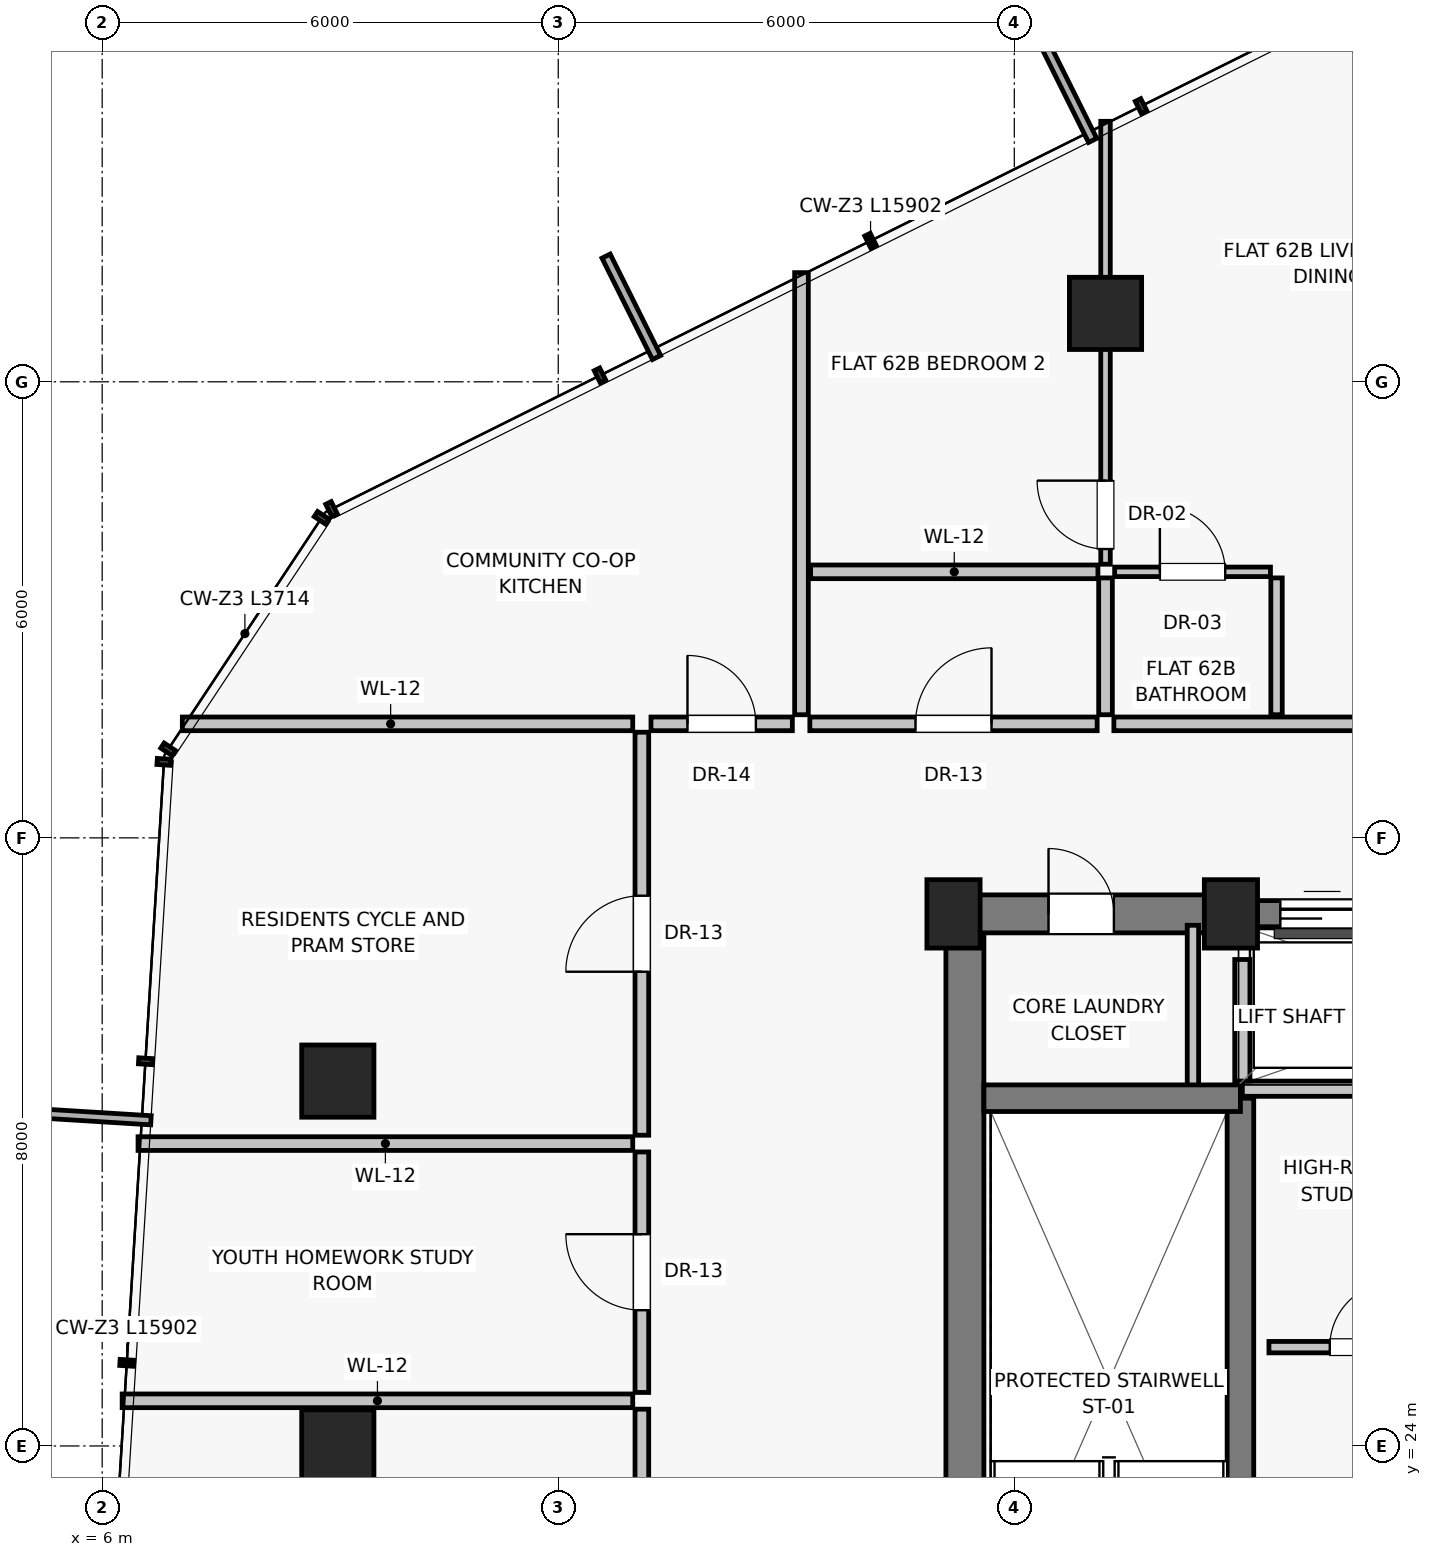
"""IFC4 building model, lengths in metres.
Left out: names, types, materials, properties, quantities, classifications, styles, units other than length and angle.
Written with IfcOpenShell. Run it as: python <this file> out.ifc"""

import sys

from ifc_helpers import new_model, si_unit, direction, frame, frame_2d, origin, origin_2d, place, context, subcontext, project, spatial, rectangle, extrude, source, transform, mapped, element, fill, save


model = new_model("IFC4")
c1 = context("Model", 3, precision=1e-05, world=origin(), true_north=direction((0.0, 1.0)))
c2 = subcontext(c1, "Body", "Model", "MODEL_VIEW")
j1 = project(units=[si_unit("LENGTHUNIT", "METRE"), si_unit("PLANEANGLEUNIT", "RADIAN")], contexts=[c1])
p1 = place(None, origin())
s1 = spatial("IfcSite", under=j1, at=p1, CompositionType="ELEMENT")
p2 = place(p1, origin())
s2 = spatial("IfcBuilding", under=s1, at=p2, CompositionType="ELEMENT")
p3 = place(p2, frame((0.0, 0.0, 218.9)))
s3 = spatial("IfcBuildingStorey", under=s2, at=p3, CompositionType="ELEMENT", Elevation=218.9)
for number, where, z_axis, x_axis in (
    (1, (17.2, 31.0, 0.0), (0.0, 0.0, 1.0), (1.0, 0.0, 0.0)),
    (2, (20.85, 31.0, 0.0), (0.0, 0.0, 1.0), (1.0, 0.0, 0.0)),
):
    element("IfcColumn", number, at=place(p3, frame(where, z_axis=z_axis, x_axis=x_axis)), inside=s3, PredefinedType="PILASTER", context=c2, shape_type="SweptSolid", body=[
        extrude(rectangle(XDim=0.7, YDim=0.9, at=origin_2d()), origin(), (0.0, 0.0, 1.0), 3.25),
    ])
for number, where, z_axis, x_axis in (
    (3, (19.2, 38.9, 0.0), (0.0, 0.0, 1.0), (1.0, 0.0, 0.0)),
    (4, (9.1, 28.8, 0.0), (0.0, 0.0, 1.0), (1.0, 0.0, 0.0)),
    (5, (9.1, 24.0, 0.0), (0.0, 0.0, 1.0), (1.0, 0.0, 0.0)),
):
    element("IfcColumn", number, at=place(p3, frame(where, z_axis=z_axis, x_axis=x_axis)), inside=s3, PredefinedType="COLUMN", context=c2, shape_type="SweptSolid", body=[
        extrude(rectangle(XDim=0.95, YDim=0.95, at=origin_2d()), origin(), (0.0, 0.0, 1.0), 3.25),
    ])
p4 = place(p3, frame((17.35, 16.8, 0.0), z_axis=(0.0, 0.0, 1.0), x_axis=(0.0, 1.0, 0.0)))
e6 = element("IfcWall", 6, at=p4, inside=s3, PredefinedType="SHEAR", context=c2, shape_type="SweptSolid", body=[
    extrude(rectangle(XDim=14.2, YDim=0.5, at=frame_2d((7.1, 0.0))), origin(), (0.0, 0.0, 1.0), 3.015),
])
p5 = place(p3, frame((17.2, 31.0, 0.0), z_axis=(0.0, 0.0, 1.0), x_axis=(1.0, 0.0, 0.0)))
e7 = element("IfcWall", 7, at=p5, inside=s3, PredefinedType="SHEAR", context=c2, shape_type="SweptSolid", body=[
    extrude(rectangle(XDim=3.8, YDim=0.5, at=frame_2d((1.9, 0.0))), origin(), (0.0, 0.0, 1.0), 3.015),
])
p6 = place(p5, frame((1.25, 0.0, 0.0)))
e8 = element("IfcOpeningElement", 8, at=p6, cuts=e7, PredefinedType="OPENING", context=c2, shape_type="SweptSolid", body=[
    extrude(rectangle(XDim=0.86, YDim=2.01, at=frame_2d((0.43, 1.005))), frame((0.0, 0.26, 0.0), z_axis=(0.0, -1.0, 0.0), x_axis=(1.0, 0.0, 0.0)), (0.0, 0.0, 1.0), 0.52),
])
p7 = place(p3, frame((21.0, 31.0, 0.0), z_axis=(0.0, 0.0, 1.0), x_axis=(1.0, 0.0, 0.0)))
e9 = element("IfcWall", 9, at=p7, inside=s3, PredefinedType="SHEAR", context=c2, shape_type="SweptSolid", body=[
    extrude(rectangle(XDim=6.0, YDim=0.35, at=frame_2d((3.0, 0.0))), origin(), (0.0, 0.0, 1.0), 3.015),
])
p8 = place(p7, frame((0.5, 0.0, 0.0)))
e10 = element("IfcOpeningElement", 10, at=p8, cuts=e9, PredefinedType="OPENING", context=c2, shape_type="SweptSolid", body=[
    extrude(rectangle(XDim=1.1, YDim=2.08, at=frame_2d((0.55, 1.04))), frame((0.0, 0.185, 0.0), z_axis=(0.0, -1.0, 0.0), x_axis=(1.0, 0.0, 0.0)), (0.0, 0.0, 1.0), 0.37),
])
p9 = place(p7, frame((2.45, 0.0, 0.0)))
e11 = element("IfcOpeningElement", 11, at=p9, cuts=e9, PredefinedType="OPENING", context=c2, shape_type="SweptSolid", body=[
    extrude(rectangle(XDim=1.1, YDim=2.08, at=frame_2d((0.55, 1.04))), frame((0.0, 0.185, 0.0), z_axis=(0.0, -1.0, 0.0), x_axis=(1.0, 0.0, 0.0)), (0.0, 0.0, 1.0), 0.37),
])
p10 = place(p7, frame((4.4, 0.0, 0.0)))
e12 = element("IfcOpeningElement", 12, at=p10, cuts=e9, PredefinedType="OPENING", context=c2, shape_type="SweptSolid", body=[
    extrude(rectangle(XDim=1.1, YDim=2.08, at=frame_2d((0.55, 1.04))), frame((0.0, 0.185, 0.0), z_axis=(0.0, -1.0, 0.0), x_axis=(1.0, 0.0, 0.0)), (0.0, 0.0, 1.0), 0.37),
])
p11 = place(p3, frame((20.35, 28.65, 0.0), z_axis=(0.0, 0.0, 1.0), x_axis=(0.0, 1.0, 0.0)))
e13 = element("IfcWall", 13, at=p11, inside=s3, PredefinedType="PARTITIONING", context=c2, shape_type="SweptSolid", body=[
    extrude(rectangle(XDim=2.2, YDim=0.15, at=frame_2d((1.1, 0.0))), origin(), (0.0, 0.0, 1.0), 3.015),
])
p12 = place(p3, frame((20.975, 19.8, 0.0), z_axis=(0.0, 0.0, 1.0), x_axis=(0.0, 1.0, 0.0)))
e14 = element("IfcWall", 14, at=p12, inside=s3, PredefinedType="SHEAR", context=c2, shape_type="SweptSolid", body=[
    extrude(rectangle(XDim=8.775, YDim=0.35, at=frame_2d((4.387, 0.0))), origin(), (0.0, 0.0, 1.0), 3.015),
])
p13 = place(p3, frame((17.6, 28.575, 0.0), z_axis=(0.0, 0.0, 1.0), x_axis=(1.0, 0.0, 0.0)))
e15 = element("IfcWall", 15, at=p13, inside=s3, PredefinedType="SHEAR", context=c2, shape_type="SweptSolid", body=[
    extrude(rectangle(XDim=3.375, YDim=0.35, at=frame_2d((1.688, 0.0))), origin(), (0.0, 0.0, 1.0), 3.015),
])
p14 = place(p3, frame((21.0, 28.7, 0.0), z_axis=(0.0, 0.0, 1.0), x_axis=(1.0, 0.0, 0.0)))
e16 = element("IfcWall", 16, at=p14, inside=s3, PredefinedType="SOLIDWALL", context=c2, shape_type="SweptSolid", body=[
    extrude(rectangle(XDim=6.0, YDim=0.2, at=frame_2d((3.0, 0.0))), origin(), (0.0, 0.0, 1.0), 3.015),
])
p15 = place(p3, frame((21.0, 28.8, 0.0), z_axis=(0.0, 0.0, 1.0), x_axis=(0.0, 1.0, 0.0)))
e17 = element("IfcWall", 17, at=p15, inside=s3, PredefinedType="SOLIDWALL", context=c2, shape_type="SweptSolid", body=[
    extrude(rectangle(XDim=1.6, YDim=0.2, at=frame_2d((0.8, 0.0))), origin(), (0.0, 0.0, 1.0), 3.015),
])
p16 = place(p3, frame((21.35, 25.3, 0.0), z_axis=(0.0, 0.0, 1.0), x_axis=(1.0, 0.0, 0.0)))
e18 = element("IfcWall", 18, at=p16, inside=s3, PredefinedType="PARTITIONING", context=c2, shape_type="SweptSolid", body=[
    extrude(rectangle(XDim=2.55, YDim=0.15, at=frame_2d((1.275, 0.0))), origin(), (0.0, 0.0, 1.0), 3.015),
])
p17 = place(p16, frame((0.8, 0.0, 0.0)))
e19 = element("IfcOpeningElement", 19, at=p17, cuts=e18, PredefinedType="OPENING", context=c2, shape_type="SweptSolid", body=[
    extrude(rectangle(XDim=0.86, YDim=2.01, at=frame_2d((0.43, 1.005))), frame((0.0, 0.085, 0.0), z_axis=(0.0, -1.0, 0.0), x_axis=(1.0, 0.0, 0.0)), (0.0, 0.0, 1.0), 0.17),
])
p18 = place(p3, frame((15.2, 33.62, 0.0), z_axis=(0.0, 0.0, 1.0), x_axis=(0.0, 1.0, 0.0)))
e20 = element("IfcWall", 20, at=p18, inside=s3, PredefinedType="PARTITIONING", context=c2, shape_type="SweptSolid", body=[
    extrude(rectangle(XDim=5.816, YDim=0.18, at=frame_2d((2.908, 0.0))), origin(), (0.0, 0.0, 1.0), 3.015),
])
p19 = place(p3, frame((15.31, 33.5, 0.0), z_axis=(0.0, 0.0, 1.0), x_axis=(1.0, 0.0, 0.0)))
e21 = element("IfcWall", 21, at=p19, inside=s3, PredefinedType="PARTITIONING", context=c2, shape_type="SweptSolid", body=[
    extrude(rectangle(XDim=3.78, YDim=0.18, at=frame_2d((1.89, 0.0))), origin(), (0.0, 0.0, 1.0), 3.015),
])
p20 = place(p19, frame((1.39, 0.0, 0.0)))
e22 = element("IfcOpeningElement", 22, at=p20, cuts=e21, PredefinedType="OPENING", context=c2, shape_type="SweptSolid", body=[
    extrude(rectangle(XDim=1.0, YDim=2.01, at=frame_2d((0.5, 1.005))), frame((0.0, 0.1, 0.0), z_axis=(0.0, -1.0, 0.0), x_axis=(1.0, 0.0, 0.0)), (0.0, 0.0, 1.0), 0.2),
])
p21 = place(p3, frame((19.31, 33.5, 0.0), z_axis=(0.0, 0.0, 1.0), x_axis=(1.0, 0.0, 0.0)))
e23 = element("IfcWall", 23, at=p21, inside=s3, PredefinedType="PARTITIONING", context=c2, shape_type="SweptSolid", body=[
    extrude(rectangle(XDim=11.78, YDim=0.18, at=frame_2d((5.89, 0.0))), origin(), (0.0, 0.0, 1.0), 3.015),
])
p22 = place(p21, frame((3.98, 0.0, 0.0)))
e24 = element("IfcOpeningElement", 24, at=p22, cuts=e23, PredefinedType="OPENING", context=c2, shape_type="SweptSolid", body=[
    extrude(rectangle(XDim=0.95, YDim=2.02, at=frame_2d((0.475, 1.01))), frame((0.0, 0.1, 0.0), z_axis=(0.0, -1.0, 0.0), x_axis=(1.0, 0.0, 0.0)), (0.0, 0.0, 1.0), 0.2),
])
p23 = place(p3, frame((15.32, 35.5, 0.0), z_axis=(0.0, 0.0, 1.0), x_axis=(1.0, 0.0, 0.0)))
e25 = element("IfcWall", 25, at=p23, inside=s3, PredefinedType="PARTITIONING", context=c2, shape_type="SweptSolid", body=[
    extrude(rectangle(XDim=3.78, YDim=0.18, at=frame_2d((1.89, 0.0))), origin(), (0.0, 0.0, 1.0), 3.015),
])
p24 = place(p3, frame((19.2, 33.62, 0.0), z_axis=(0.0, 0.0, 1.0), x_axis=(0.0, 1.0, 0.0)))
e26 = element("IfcWall", 26, at=p24, inside=s3, PredefinedType="PARTITIONING", context=c2, shape_type="SweptSolid", body=[
    extrude(rectangle(XDim=1.8, YDim=0.18, at=frame_2d((0.9, 0.0))), origin(), (0.0, 0.0, 1.0), 3.015),
])
p25 = place(p3, frame((19.2, 35.6, 0.0), z_axis=(0.0, 0.0, 1.0), x_axis=(0.0, 1.0, 0.0)))
e27 = element("IfcWall", 27, at=p25, inside=s3, PredefinedType="PARTITIONING", context=c2, shape_type="SweptSolid", body=[
    extrude(rectangle(XDim=5.827, YDim=0.125, at=frame_2d((2.914, 0.0))), origin(), (0.0, 0.0, 1.0), 2.469),
])
p26 = place(p25, frame((0.2, 0.0, 0.0)))
e28 = element("IfcOpeningElement", 28, at=p26, cuts=e27, PredefinedType="OPENING", context=c2, shape_type="SweptSolid", body=[
    extrude(rectangle(XDim=0.9, YDim=2.01, at=frame_2d((0.45, 1.005))), frame((0.0, 0.073, 0.0), z_axis=(0.0, -1.0, 0.0), x_axis=(1.0, 0.0, 0.0)), (0.0, 0.0, 1.0), 0.145),
])
p27 = place(p3, frame((21.45, 33.62, 0.0), z_axis=(0.0, 0.0, 1.0), x_axis=(0.0, 1.0, 0.0)))
e29 = element("IfcWall", 29, at=p27, inside=s3, PredefinedType="PARTITIONING", context=c2, shape_type="SweptSolid", body=[
    extrude(rectangle(XDim=1.8, YDim=0.15, at=frame_2d((0.9, 0.0))), origin(), (0.0, 0.0, 1.0), 3.015),
])
p28 = place(p3, frame((19.32, 35.5, 0.0), z_axis=(0.0, 0.0, 1.0), x_axis=(1.0, 0.0, 0.0)))
e30 = element("IfcWall", 30, at=p28, inside=s3, PredefinedType="PARTITIONING", context=c2, shape_type="SweptSolid", body=[
    extrude(rectangle(XDim=2.05, YDim=0.125, at=frame_2d((1.025, 0.0))), origin(), (0.0, 0.0, 1.0), 2.662),
])
p29 = place(p28, frame((0.595, 0.0, 0.0)))
e31 = element("IfcOpeningElement", 31, at=p29, cuts=e30, PredefinedType="OPENING", context=c2, shape_type="SweptSolid", body=[
    extrude(rectangle(XDim=0.86, YDim=2.01, at=frame_2d((0.43, 1.005))), frame((0.0, 0.073, 0.0), z_axis=(0.0, -1.0, 0.0), x_axis=(1.0, 0.0, 0.0)), (0.0, 0.0, 1.0), 0.145),
])
p30 = place(p3, frame((12.98, 33.5, 0.0), z_axis=(0.0, 0.0, 1.0), x_axis=(-1.0, 0.0, 0.0)))
e32 = element("IfcWall", 32, at=p30, inside=s3, PredefinedType="PARTITIONING", context=c2, shape_type="SweptSolid", body=[
    extrude(rectangle(XDim=5.926, YDim=0.18, at=frame_2d((2.963, 0.0))), origin(), (0.0, 0.0, 1.0), 3.015),
])
p31 = place(p3, frame((13.1, 18.322, 0.0), z_axis=(0.0, 0.0, 1.0), x_axis=(0.0, 1.0, 0.0)))
e33 = element("IfcWall", 33, at=p31, inside=s3, PredefinedType="PARTITIONING", context=c2, shape_type="SweptSolid", body=[
    extrude(rectangle(XDim=6.162, YDim=0.18, at=frame_2d((3.081, 0.0))), origin(), (0.0, 0.0, 1.0), 2.662),
])
p32 = place(p31, frame((2.581, 0.0, 0.0)))
e34 = element("IfcOpeningElement", 34, at=p32, cuts=e33, PredefinedType="OPENING", context=c2, shape_type="SweptSolid", body=[
    extrude(rectangle(XDim=1.0, YDim=2.01, at=frame_2d((0.5, 1.005))), frame((0.0, 0.1, 0.0), z_axis=(0.0, -1.0, 0.0), x_axis=(1.0, 0.0, 0.0)), (0.0, 0.0, 1.0), 0.2),
])
p33 = place(p3, frame((12.98, 24.594, 0.0), z_axis=(0.0, 0.0, 1.0), x_axis=(-1.0, 0.0, 0.0)))
e35 = element("IfcWall", 35, at=p33, inside=s3, PredefinedType="PARTITIONING", context=c2, shape_type="SweptSolid", body=[
    extrude(rectangle(XDim=6.717, YDim=0.18, at=frame_2d((3.359, 0.0))), origin(), (0.0, 0.0, 1.0), 3.015),
])
p34 = place(p3, frame((13.1, 24.704, 0.0), z_axis=(0.0, 0.0, 1.0), x_axis=(0.0, 1.0, 0.0)))
e36 = element("IfcWall", 36, at=p34, inside=s3, PredefinedType="PARTITIONING", context=c2, shape_type="SweptSolid", body=[
    extrude(rectangle(XDim=3.164, YDim=0.18, at=frame_2d((1.582, 0.0))), origin(), (0.0, 0.0, 1.0), 2.662),
])
p35 = place(p34, frame((1.082, 0.0, 0.0)))
e37 = element("IfcOpeningElement", 37, at=p35, cuts=e36, PredefinedType="OPENING", context=c2, shape_type="SweptSolid", body=[
    extrude(rectangle(XDim=1.0, YDim=2.01, at=frame_2d((0.5, 1.005))), frame((0.0, 0.1, 0.0), z_axis=(0.0, -1.0, 0.0), x_axis=(1.0, 0.0, 0.0)), (0.0, 0.0, 1.0), 0.2),
])
p36 = place(p3, frame((13.1, 28.088, 0.0), z_axis=(0.0, 0.0, 1.0), x_axis=(0.0, 1.0, 0.0)))
e38 = element("IfcWall", 38, at=p36, inside=s3, PredefinedType="PARTITIONING", context=c2, shape_type="SweptSolid", body=[
    extrude(rectangle(XDim=5.302, YDim=0.18, at=frame_2d((2.651, 0.0))), origin(), (0.0, 0.0, 1.0), 2.662),
])
p37 = place(p36, frame((2.151, 0.0, 0.0)))
e39 = element("IfcOpeningElement", 39, at=p37, cuts=e38, PredefinedType="OPENING", context=c2, shape_type="SweptSolid", body=[
    extrude(rectangle(XDim=1.0, YDim=2.01, at=frame_2d((0.5, 1.005))), frame((0.0, 0.1, 0.0), z_axis=(0.0, -1.0, 0.0), x_axis=(1.0, 0.0, 0.0)), (0.0, 0.0, 1.0), 0.2),
])
p38 = place(p3, frame((12.98, 27.978, 0.0), z_axis=(0.0, 0.0, 1.0), x_axis=(-1.0, 0.0, 0.0)))
e40 = element("IfcWall", 40, at=p38, inside=s3, PredefinedType="PARTITIONING", context=c2, shape_type="SweptSolid", body=[
    extrude(rectangle(XDim=6.508, YDim=0.18, at=frame_2d((3.254, 0.0))), origin(), (0.0, 0.0, 1.0), 3.015),
])
p39 = place(p3, frame((13.22, 33.5, 0.0), z_axis=(0.0, 0.0, 1.0), x_axis=(1.0, 0.0, 0.0)))
e41 = element("IfcWall", 41, at=p39, inside=s3, PredefinedType="PARTITIONING", context=c2, shape_type="SweptSolid", body=[
    extrude(rectangle(XDim=1.86, YDim=0.18, at=frame_2d((0.93, 0.0))), origin(), (0.0, 0.0, 1.0), 3.015),
])
p40 = place(p39, frame((0.48, 0.0, 0.0)))
e42 = element("IfcOpeningElement", 42, at=p40, cuts=e41, PredefinedType="OPENING", context=c2, shape_type="SweptSolid", body=[
    extrude(rectangle(XDim=0.9, YDim=2.01, at=frame_2d((0.45, 1.005))), frame((0.0, 0.1, 0.0), z_axis=(0.0, -1.0, 0.0), x_axis=(1.0, 0.0, 0.0)), (0.0, 0.0, 1.0), 0.2),
])
m1 = source(origin(), c2, "Body", "SweptSolid", [
    extrude(rectangle(XDim=0.86, YDim=2.01, at=frame_2d((0.43, 1.005))), frame((0.0, 0.025, 0.0), z_axis=(0.0, -1.0, 0.0), x_axis=(1.0, 0.0, 0.0)), (0.0, 0.0, 1.0), 0.05),
])
p41 = place(p6, origin())
e43 = element("IfcDoor", 43, at=p41, inside=s3, OperationType="SINGLE_SWING_LEFT", PredefinedType="DOOR", context=c2, shape_type="MappedRepresentation", body=[
    mapped(m1, transform((0.0, 0.0, 0.0), scale=1.0)),
])
fill(e8, e43)
m2 = source(origin(), c2, "Body", "SweptSolid", [
    extrude(rectangle(XDim=1.1, YDim=2.08, at=frame_2d((0.55, 1.04))), frame((0.0, 0.025, 0.0), z_axis=(0.0, -1.0, 0.0), x_axis=(1.0, 0.0, 0.0)), (0.0, 0.0, 1.0), 0.05),
])
p42 = place(p8, origin())
e44 = element("IfcDoor", 44, at=p42, inside=s3, OperationType="SLIDING_TO_LEFT", PredefinedType="DOOR", context=c2, shape_type="MappedRepresentation", body=[
    mapped(m2, transform((0.0, 0.0, 0.0), scale=1.0)),
])
fill(e10, e44)
p43 = place(p17, origin())
e45 = element("IfcDoor", 45, at=p43, inside=s3, OperationType="SINGLE_SWING_RIGHT", PredefinedType="DOOR", context=c2, shape_type="MappedRepresentation", body=[
    mapped(m1, transform((0.0, 0.0, 0.0), scale=1.0)),
])
fill(e19, e45)
m3 = source(origin(), c2, "Body", "SweptSolid", [
    extrude(rectangle(XDim=1.0, YDim=2.01, at=frame_2d((0.5, 1.005))), frame((0.0, 0.025, 0.0), z_axis=(0.0, -1.0, 0.0), x_axis=(1.0, 0.0, 0.0)), (0.0, 0.0, 1.0), 0.05),
])
p44 = place(p20, origin())
e46 = element("IfcDoor", 46, at=p44, inside=s3, OperationType="SINGLE_SWING_RIGHT", PredefinedType="DOOR", context=c2, shape_type="MappedRepresentation", body=[
    mapped(m3, transform((0.0, 0.0, 0.0), scale=1.0)),
])
fill(e22, e46)
m4 = source(origin(), c2, "Body", "SweptSolid", [
    extrude(rectangle(XDim=0.9, YDim=2.01, at=frame_2d((0.45, 1.005))), frame((0.0, 0.025, 0.0), z_axis=(0.0, -1.0, 0.0), x_axis=(1.0, 0.0, 0.0)), (0.0, 0.0, 1.0), 0.05),
])
p45 = place(p26, origin())
e47 = element("IfcDoor", 47, at=p45, inside=s3, OperationType="SINGLE_SWING_RIGHT", PredefinedType="DOOR", context=c2, shape_type="MappedRepresentation", body=[
    mapped(m4, transform((0.0, 0.0, 0.0), scale=1.0)),
])
fill(e28, e47)
p46 = place(p29, origin())
e48 = element("IfcDoor", 48, at=p46, inside=s3, OperationType="SINGLE_SWING_LEFT", PredefinedType="DOOR", context=c2, shape_type="MappedRepresentation", body=[
    mapped(m1, transform((0.0, 0.0, 0.0), scale=1.0)),
])
fill(e31, e48)
p47 = place(p35, origin())
e49 = element("IfcDoor", 49, at=p47, inside=s3, OperationType="SINGLE_SWING_RIGHT", PredefinedType="DOOR", context=c2, shape_type="MappedRepresentation", body=[
    mapped(m3, transform((0.0, 0.0, 0.0), scale=1.0)),
])
fill(e37, e49)
p48 = place(p37, origin())
e50 = element("IfcDoor", 50, at=p48, inside=s3, OperationType="SINGLE_SWING_LEFT", PredefinedType="DOOR", context=c2, shape_type="MappedRepresentation", body=[
    mapped(m3, transform((0.0, 0.0, 0.0), scale=1.0)),
])
fill(e39, e50)
p49 = place(p40, origin())
e51 = element("IfcDoor", 51, at=p49, inside=s3, OperationType="SINGLE_SWING_LEFT", PredefinedType="DOOR", context=c2, shape_type="MappedRepresentation", body=[
    mapped(m4, transform((0.0, 0.0, 0.0), scale=1.0)),
])
fill(e42, e51)
save(model, sys.argv[1])
